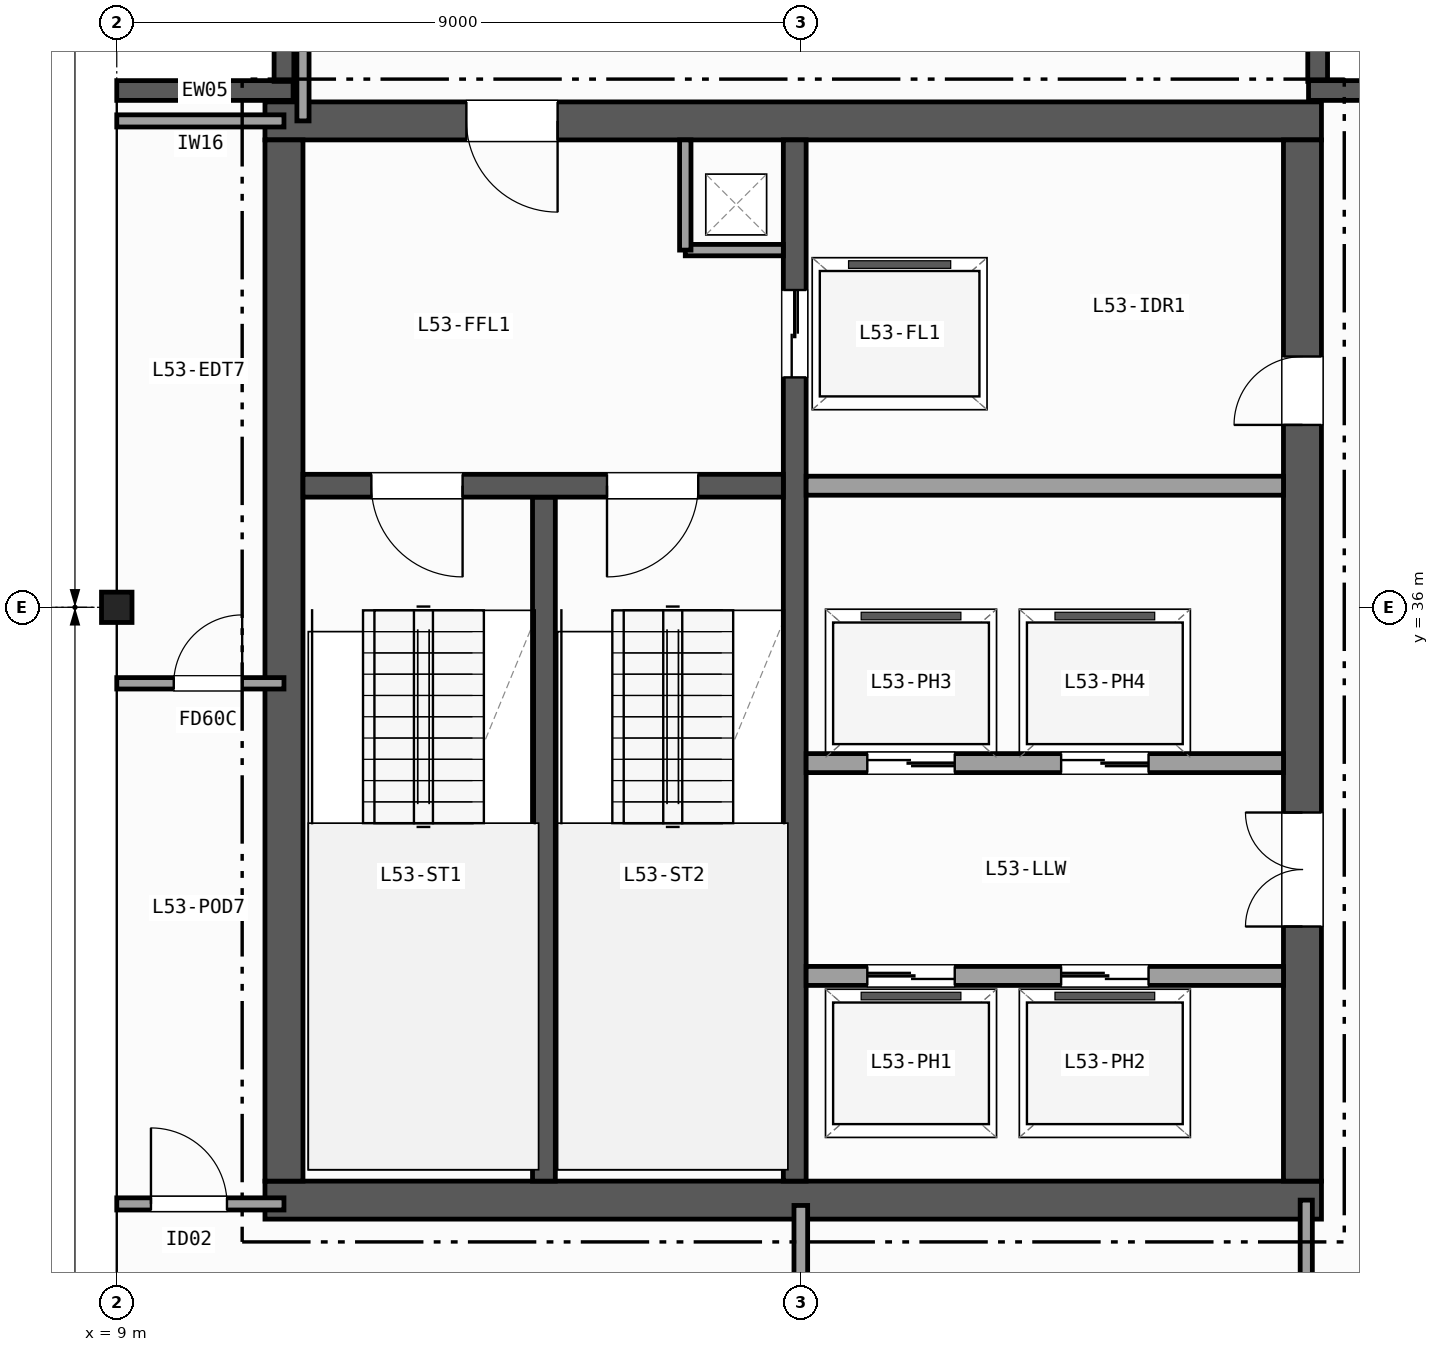
"""IFC4 building model, lengths in metres.
Left out: names, types, materials, properties, quantities, classifications, styles, units other than length and angle.
Written with IfcOpenShell. Run it as: python <this file> out.ifc"""

import sys

from ifc_helpers import new_model, si_unit, direction, frame, frame_2d, origin, origin_2d, place, context, subcontext, project, spatial, rectangle, i_section, extrude, element, fill, save


model = new_model("IFC4")
c1 = context("Model", 3, precision=1e-05, world=origin(), true_north=direction((0.0, 1.0)))
c2 = subcontext(c1, "Body", "Model", "MODEL_VIEW")
j1 = project(units=[si_unit("LENGTHUNIT", "METRE"), si_unit("PLANEANGLEUNIT", "RADIAN")], contexts=[c1])
p1 = place(None, origin())
s1 = spatial("IfcSite", under=j1, at=p1, CompositionType="ELEMENT")
p2 = place(p1, origin())
s2 = spatial("IfcBuilding", under=s1, at=p2, CompositionType="ELEMENT")
p3 = place(p2, frame((0.0, 0.0, 213.6)))
s3 = spatial("IfcBuildingStorey", under=s2, at=p3, CompositionType="ELEMENT", Elevation=213.6)
p4 = place(p3, frame((9.0, 36.0, 0.0), z_axis=(0.0, 0.0, 1.0), x_axis=(1.0, 0.0, 0.0)))
e1 = element("IfcColumn", 1, at=p4, inside=s3, PredefinedType="COLUMN", context=c2, shape_type="SweptSolid", body=[
    extrude(i_section(OverallWidth=0.401, OverallDepth=0.399, WebThickness=0.025, FlangeThickness=0.04, FilletRadius=0.015, at=origin_2d()), origin(), (0.0, 0.0, 1.0), 3.7),
])
p5 = place(p3, frame((9.0, 42.8, 0.0), z_axis=(0.0, 0.0, 1.0), x_axis=(1.0, 0.0, 0.0)))
e2 = element("IfcWall", 2, at=p5, inside=s3, PredefinedType="SOLIDWALL", context=c2, shape_type="SweptSolid", body=[
    extrude(rectangle(XDim=2.32, YDim=0.26, at=frame_2d((1.16, 0.0))), origin(), (0.0, 0.0, 1.0), 3.42),
])
for number, where, z_axis, x_axis in (
    (3, (11.2, 42.92, 0.0), (0.0, 0.0, 1.0), (0.0, 1.0, 0.0)),
    (4, (24.8, 45.0, 0.0), (0.0, 0.0, 1.0), (0.0, -1.0, 0.0)),
):
    element("IfcWall", number, at=place(p3, frame(where, z_axis=z_axis, x_axis=x_axis)), inside=s3, PredefinedType="SOLIDWALL", context=c2, shape_type="SweptSolid", body=[
        extrude(rectangle(XDim=2.08, YDim=0.26, at=frame_2d((1.04, 0.0))), origin(), (0.0, 0.0, 1.0), 3.42),
    ])
p6 = place(p3, frame((24.68, 42.8, 0.0), z_axis=(0.0, 0.0, 1.0), x_axis=(1.0, 0.0, 0.0)))
e5 = element("IfcWall", 5, at=p6, inside=s3, PredefinedType="SOLIDWALL", context=c2, shape_type="SweptSolid", body=[
    extrude(rectangle(XDim=2.32, YDim=0.26, at=frame_2d((1.16, 0.0))), origin(), (0.0, 0.0, 1.0), 3.42),
])
p7 = place(p3, frame((10.95, 28.2, 0.0), z_axis=(0.0, 0.0, 1.0), x_axis=(1.0, 0.0, 0.0)))
e6 = element("IfcWall", 6, at=p7, inside=s3, PredefinedType="SHEAR", context=c2, shape_type="SweptSolid", body=[
    extrude(rectangle(XDim=13.9, YDim=0.5, at=frame_2d((6.95, 0.0))), origin(), (0.0, 0.0, 1.0), 3.42),
])
p8 = place(p3, frame((24.85, 42.4, 0.0), z_axis=(0.0, 0.0, 1.0), x_axis=(-1.0, 0.0, 0.0)))
e7 = element("IfcWall", 7, at=p8, inside=s3, PredefinedType="SHEAR", context=c2, shape_type="SweptSolid", body=[
    extrude(rectangle(XDim=13.9, YDim=0.5, at=frame_2d((6.95, 0.0))), origin(), (0.0, 0.0, 1.0), 3.42),
])
p9 = place(p8, frame((10.05, 0.0, 0.0)))
e8 = element("IfcOpeningElement", 8, at=p9, cuts=e7, PredefinedType="OPENING", context=c2, shape_type="SweptSolid", body=[
    extrude(rectangle(XDim=1.2, YDim=2.15, at=frame_2d((0.6, 1.075))), frame((0.0, 0.26, 0.0), z_axis=(0.0, -1.0, 0.0), x_axis=(1.0, 0.0, 0.0)), (0.0, 0.0, 1.0), 0.52),
])
p10 = place(p3, frame((11.2, 42.15, 0.0), z_axis=(0.0, 0.0, 1.0), x_axis=(0.0, -1.0, 0.0)))
e9 = element("IfcWall", 9, at=p10, inside=s3, PredefinedType="SHEAR", context=c2, shape_type="SweptSolid", body=[
    extrude(rectangle(XDim=13.7, YDim=0.5, at=frame_2d((6.85, 0.0))), origin(), (0.0, 0.0, 1.0), 3.42),
])
p11 = place(p3, frame((24.6, 28.45, 0.0), z_axis=(0.0, 0.0, 1.0), x_axis=(0.0, 1.0, 0.0)))
e10 = element("IfcWall", 10, at=p11, inside=s3, PredefinedType="SHEAR", context=c2, shape_type="SweptSolid", body=[
    extrude(rectangle(XDim=13.7, YDim=0.5, at=frame_2d((6.85, 0.0))), origin(), (0.0, 0.0, 1.0), 3.42),
])
p12 = place(p11, frame((3.35, 0.0, 0.0)))
e11 = element("IfcOpeningElement", 11, at=p12, cuts=e10, PredefinedType="OPENING", context=c2, shape_type="SweptSolid", body=[
    extrude(rectangle(XDim=1.5, YDim=2.2, at=frame_2d((0.75, 1.1))), frame((0.0, 0.26, 0.0), z_axis=(0.0, -1.0, 0.0), x_axis=(1.0, 0.0, 0.0)), (0.0, 0.0, 1.0), 0.52),
])
p13 = place(p11, frame((9.95, 0.0, 0.0)))
e12 = element("IfcOpeningElement", 12, at=p13, cuts=e10, PredefinedType="OPENING", context=c2, shape_type="SweptSolid", body=[
    extrude(rectangle(XDim=0.9, YDim=2.1, at=frame_2d((0.45, 1.05))), frame((0.0, 0.26, 0.0), z_axis=(0.0, -1.0, 0.0), x_axis=(1.0, 0.0, 0.0)), (0.0, 0.0, 1.0), 0.52),
])
p14 = place(p3, frame((14.62, 28.45, 0.0), z_axis=(0.0, 0.0, 1.0), x_axis=(0.0, 1.0, 0.0)))
e13 = element("IfcWall", 13, at=p14, inside=s3, PredefinedType="SHEAR", context=c2, shape_type="SweptSolid", body=[
    extrude(rectangle(XDim=9.0, YDim=0.3, at=frame_2d((4.5, 0.0))), origin(), (0.0, 0.0, 1.0), 3.42),
])
p15 = place(p3, frame((17.92, 42.15, 0.0), z_axis=(0.0, 0.0, 1.0), x_axis=(0.0, -1.0, 0.0)))
e14 = element("IfcWall", 14, at=p15, inside=s3, PredefinedType="SHEAR", context=c2, shape_type="SweptSolid", body=[
    extrude(rectangle(XDim=13.7, YDim=0.3, at=frame_2d((6.85, 0.0))), origin(), (0.0, 0.0, 1.0), 3.42),
])
p16 = place(p15, frame((1.975, 0.0, 0.0)))
e15 = element("IfcOpeningElement", 15, at=p16, cuts=e14, PredefinedType="OPENING", context=c2, shape_type="SweptSolid", body=[
    extrude(rectangle(XDim=1.15, YDim=2.15, at=frame_2d((0.575, 1.075))), frame((0.0, 0.16, 0.0), z_axis=(0.0, -1.0, 0.0), x_axis=(1.0, 0.0, 0.0)), (0.0, 0.0, 1.0), 0.32),
])
p17 = place(p3, frame((17.77, 37.6, 0.0), z_axis=(0.0, 0.0, 1.0), x_axis=(-1.0, 0.0, 0.0)))
e16 = element("IfcWall", 16, at=p17, inside=s3, PredefinedType="SHEAR", context=c2, shape_type="SweptSolid", body=[
    extrude(rectangle(XDim=6.32, YDim=0.3, at=frame_2d((3.16, 0.0))), origin(), (0.0, 0.0, 1.0), 3.42),
])
p18 = place(p17, frame((4.22, 0.0, 0.0)))
e17 = element("IfcOpeningElement", 17, at=p18, cuts=e16, PredefinedType="OPENING", context=c2, shape_type="SweptSolid", body=[
    extrude(rectangle(XDim=1.2, YDim=2.15, at=frame_2d((0.6, 1.075))), frame((0.0, 0.16, 0.0), z_axis=(0.0, -1.0, 0.0), x_axis=(1.0, 0.0, 0.0)), (0.0, 0.0, 1.0), 0.32),
])
p19 = place(p17, frame((1.12, 0.0, 0.0)))
e18 = element("IfcOpeningElement", 18, at=p19, cuts=e16, PredefinedType="OPENING", context=c2, shape_type="SweptSolid", body=[
    extrude(rectangle(XDim=1.2, YDim=2.15, at=frame_2d((0.6, 1.075))), frame((0.0, 0.16, 0.0), z_axis=(0.0, -1.0, 0.0), x_axis=(1.0, 0.0, 0.0)), (0.0, 0.0, 1.0), 0.32),
])
p20 = place(p3, frame((16.48, 40.7, 0.0), z_axis=(0.0, 0.0, 1.0), x_axis=(1.0, 0.0, 0.0)))
e19 = element("IfcWall", 19, at=p20, inside=s3, PredefinedType="PARTITIONING", context=c2, shape_type="SweptSolid", body=[
    extrude(rectangle(XDim=1.29, YDim=0.15, at=frame_2d((0.645, 0.0))), origin(), (0.0, 0.0, 1.0), 3.42),
])
p21 = place(p3, frame((16.48, 40.7, 0.0), z_axis=(0.0, 0.0, 1.0), x_axis=(0.0, 1.0, 0.0)))
e20 = element("IfcWall", 20, at=p21, inside=s3, PredefinedType="PARTITIONING", context=c2, shape_type="SweptSolid", body=[
    extrude(rectangle(XDim=1.45, YDim=0.15, at=frame_2d((0.725, 0.0))), origin(), (0.0, 0.0, 1.0), 3.42),
])
p22 = place(p3, frame((18.07, 37.6, 0.0), z_axis=(0.0, 0.0, 1.0), x_axis=(1.0, 0.0, 0.0)))
e21 = element("IfcWall", 21, at=p22, inside=s3, PredefinedType="PARTITIONING", context=c2, shape_type="SweptSolid", body=[
    extrude(rectangle(XDim=6.28, YDim=0.25, at=frame_2d((3.14, 0.0))), origin(), (0.0, 0.0, 1.0), 3.42),
])
p23 = place(p3, frame((18.07, 31.15, 0.0), z_axis=(0.0, 0.0, 1.0), x_axis=(1.0, 0.0, 0.0)))
e22 = element("IfcWall", 22, at=p23, inside=s3, PredefinedType="PARTITIONING", context=c2, shape_type="SweptSolid", body=[
    extrude(rectangle(XDim=6.28, YDim=0.25, at=frame_2d((3.14, 0.0))), origin(), (0.0, 0.0, 1.0), 3.42),
])
p24 = place(p23, frame((0.805, 0.0, 0.0)))
e23 = element("IfcOpeningElement", 23, at=p24, cuts=e22, PredefinedType="OPENING", context=c2, shape_type="SweptSolid", body=[
    extrude(rectangle(XDim=1.15, YDim=2.15, at=frame_2d((0.575, 1.075))), frame((0.0, 0.135, 0.0), z_axis=(0.0, -1.0, 0.0), x_axis=(1.0, 0.0, 0.0)), (0.0, 0.0, 1.0), 0.27),
])
p25 = place(p23, frame((3.355, 0.0, 0.0)))
e24 = element("IfcOpeningElement", 24, at=p25, cuts=e22, PredefinedType="OPENING", context=c2, shape_type="SweptSolid", body=[
    extrude(rectangle(XDim=1.15, YDim=2.15, at=frame_2d((0.575, 1.075))), frame((0.0, 0.135, 0.0), z_axis=(0.0, -1.0, 0.0), x_axis=(1.0, 0.0, 0.0)), (0.0, 0.0, 1.0), 0.27),
])
p26 = place(p3, frame((24.35, 33.95, 0.0), z_axis=(0.0, 0.0, 1.0), x_axis=(-1.0, 0.0, 0.0)))
e25 = element("IfcWall", 25, at=p26, inside=s3, PredefinedType="PARTITIONING", context=c2, shape_type="SweptSolid", body=[
    extrude(rectangle(XDim=6.28, YDim=0.25, at=frame_2d((3.14, 0.0))), origin(), (0.0, 0.0, 1.0), 3.42),
])
p27 = place(p26, frame((4.325, 0.0, 0.0)))
e26 = element("IfcOpeningElement", 26, at=p27, cuts=e25, PredefinedType="OPENING", context=c2, shape_type="SweptSolid", body=[
    extrude(rectangle(XDim=1.15, YDim=2.15, at=frame_2d((0.575, 1.075))), frame((0.0, 0.135, 0.0), z_axis=(0.0, -1.0, 0.0), x_axis=(1.0, 0.0, 0.0)), (0.0, 0.0, 1.0), 0.27),
])
p28 = place(p26, frame((1.775, 0.0, 0.0)))
e27 = element("IfcOpeningElement", 27, at=p28, cuts=e25, PredefinedType="OPENING", context=c2, shape_type="SweptSolid", body=[
    extrude(rectangle(XDim=1.15, YDim=2.15, at=frame_2d((0.575, 1.075))), frame((0.0, 0.135, 0.0), z_axis=(0.0, -1.0, 0.0), x_axis=(1.0, 0.0, 0.0)), (0.0, 0.0, 1.0), 0.27),
])
p29 = place(p3, frame((9.0, 28.15, 0.0), z_axis=(0.0, 0.0, 1.0), x_axis=(1.0, 0.0, 0.0)))
e28 = element("IfcWall", 28, at=p29, inside=s3, PredefinedType="PARTITIONING", context=c2, shape_type="SweptSolid", body=[
    extrude(rectangle(XDim=2.2, YDim=0.16, at=frame_2d((1.1, 0.0))), origin(), (0.0, 0.0, 1.0), 2.707),
])
p30 = place(p29, frame((0.45, 0.0, 0.0)))
e29 = element("IfcOpeningElement", 29, at=p30, cuts=e28, PredefinedType="OPENING", context=c2, shape_type="SweptSolid", body=[
    extrude(rectangle(XDim=1.0, YDim=2.1, at=frame_2d((0.5, 1.05))), frame((0.0, 0.09, 0.0), z_axis=(0.0, -1.0, 0.0), x_axis=(1.0, 0.0, 0.0)), (0.0, 0.0, 1.0), 0.18),
])
p31 = place(p3, frame((9.0, 42.4, 0.0), z_axis=(0.0, 0.0, 1.0), x_axis=(1.0, 0.0, 0.0)))
e30 = element("IfcWall", 30, at=p31, inside=s3, PredefinedType="PARTITIONING", context=c2, shape_type="SweptSolid", body=[
    extrude(rectangle(XDim=2.2, YDim=0.16, at=frame_2d((1.1, 0.0))), origin(), (0.0, 0.0, 1.0), 3.42),
])
p32 = place(p3, frame((11.45, 42.4, 0.0), z_axis=(0.0, 0.0, 1.0), x_axis=(0.0, 1.0, 0.0)))
e31 = element("IfcWall", 31, at=p32, inside=s3, PredefinedType="PARTITIONING", context=c2, shape_type="SweptSolid", body=[
    extrude(rectangle(XDim=2.666, YDim=0.16, at=frame_2d((1.333, 0.0))), origin(), (0.0, 0.0, 1.0), 3.42),
])
p33 = place(p3, frame((9.0, 35.0, 0.0), z_axis=(0.0, 0.0, 1.0), x_axis=(1.0, 0.0, 0.0)))
e32 = element("IfcWall", 32, at=p33, inside=s3, PredefinedType="PARTITIONING", context=c2, shape_type="SweptSolid", body=[
    extrude(rectangle(XDim=2.2, YDim=0.15, at=frame_2d((1.1, 0.0))), origin(), (0.0, 0.0, 1.0), 2.707),
])
p34 = place(p33, frame((0.75, 0.0, 0.0)))
e33 = element("IfcOpeningElement", 33, at=p34, cuts=e32, PredefinedType="OPENING", context=c2, shape_type="SweptSolid", body=[
    extrude(rectangle(XDim=0.9, YDim=2.1, at=frame_2d((0.45, 1.05))), frame((0.0, 0.085, 0.0), z_axis=(0.0, -1.0, 0.0), x_axis=(1.0, 0.0, 0.0)), (0.0, 0.0, 1.0), 0.17),
])
p35 = place(p3, frame((24.65, 9.0, 0.0), z_axis=(0.0, 0.0, 1.0), x_axis=(0.0, 1.0, 0.0)))
e34 = element("IfcWall", 34, at=p35, inside=s3, PredefinedType="PARTITIONING", context=c2, shape_type="SweptSolid", body=[
    extrude(rectangle(XDim=19.2, YDim=0.16, at=frame_2d((9.6, 0.0))), origin(), (0.0, 0.0, 1.0), 2.707),
])
p36 = place(p35, frame((2.8, 0.0, 0.0)))
e35 = element("IfcOpeningElement", 35, at=p36, cuts=e34, PredefinedType="OPENING", context=c2, shape_type="SweptSolid", body=[
    extrude(rectangle(XDim=1.2, YDim=2.15, at=frame_2d((0.6, 1.075))), frame((0.0, 0.09, 0.0), z_axis=(0.0, -1.0, 0.0), x_axis=(1.0, 0.0, 0.0)), (0.0, 0.0, 1.0), 0.18),
])
p37 = place(p35, frame((8.95, 0.0, 0.0)))
e36 = element("IfcOpeningElement", 36, at=p37, cuts=e34, PredefinedType="OPENING", context=c2, shape_type="SweptSolid", body=[
    extrude(rectangle(XDim=0.86, YDim=2.05, at=frame_2d((0.43, 1.025))), frame((0.0, 0.09, 0.0), z_axis=(0.0, -1.0, 0.0), x_axis=(1.0, 0.0, 0.0)), (0.0, 0.0, 1.0), 0.18),
])
p38 = place(p35, frame((15.215, 0.0, 0.0)))
e37 = element("IfcOpeningElement", 37, at=p38, cuts=e34, PredefinedType="OPENING", context=c2, shape_type="SweptSolid", body=[
    extrude(rectangle(XDim=0.95, YDim=2.1, at=frame_2d((0.475, 1.05))), frame((0.0, 0.09, 0.0), z_axis=(0.0, -1.0, 0.0), x_axis=(1.0, 0.0, 0.0)), (0.0, 0.0, 1.0), 0.18),
])
p39 = place(p3, frame((18.0, 9.0, 0.0), z_axis=(0.0, 0.0, 1.0), x_axis=(0.0, 1.0, 0.0)))
e38 = element("IfcWall", 38, at=p39, inside=s3, PredefinedType="PARTITIONING", context=c2, shape_type="SweptSolid", body=[
    extrude(rectangle(XDim=19.13, YDim=0.18, at=frame_2d((9.565, 0.0))), origin(), (0.0, 0.0, 1.0), 2.707),
])
p40 = place(p39, frame((2.2, 0.0, 0.0)))
e39 = element("IfcOpeningElement", 39, at=p40, cuts=e38, PredefinedType="OPENING", context=c2, shape_type="SweptSolid", body=[
    extrude(rectangle(XDim=1.0, YDim=2.1, at=frame_2d((0.5, 1.05))), frame((0.0, 0.1, 0.0), z_axis=(0.0, -1.0, 0.0), x_axis=(1.0, 0.0, 0.0)), (0.0, 0.0, 1.0), 0.2),
])
p41 = place(p39, frame((13.5, 0.0, 0.0)))
e40 = element("IfcOpeningElement", 40, at=p41, cuts=e38, PredefinedType="OPENING", context=c2, shape_type="SweptSolid", body=[
    extrude(rectangle(XDim=1.05, YDim=2.15, at=frame_2d((0.525, 1.075))), frame((0.0, 0.1, 0.0), z_axis=(0.0, -1.0, 0.0), x_axis=(1.0, 0.0, 0.0)), (0.0, 0.0, 1.0), 0.2),
])
p42 = place(p18, origin())
e41 = element("IfcDoor", 41, at=p42, inside=s3, OperationType="SINGLE_SWING_LEFT", PredefinedType="DOOR", context=c2, shape_type="SweptSolid", body=[
    extrude(rectangle(XDim=1.2, YDim=2.15, at=frame_2d((0.6, 1.075))), frame((0.0, 0.025, 0.0), z_axis=(0.0, -1.0, 0.0), x_axis=(1.0, 0.0, 0.0)), (0.0, 0.0, 1.0), 0.05),
])
fill(e17, e41)
p43 = place(p19, origin())
e42 = element("IfcDoor", 42, at=p43, inside=s3, OperationType="SINGLE_SWING_RIGHT", PredefinedType="DOOR", context=c2, shape_type="SweptSolid", body=[
    extrude(rectangle(XDim=1.2, YDim=2.15, at=frame_2d((0.6, 1.075))), frame((0.0, 0.025, 0.0), z_axis=(0.0, -1.0, 0.0), x_axis=(1.0, 0.0, 0.0)), (0.0, 0.0, 1.0), 0.05),
])
fill(e18, e42)
p44 = place(p12, origin())
e43 = element("IfcDoor", 43, at=p44, inside=s3, OperationType="DOUBLE_DOOR_SINGLE_SWING", PredefinedType="DOOR", context=c2, shape_type="SweptSolid", body=[
    extrude(rectangle(XDim=1.5, YDim=2.2, at=frame_2d((0.75, 1.1))), frame((0.0, 0.025, 0.0), z_axis=(0.0, -1.0, 0.0), x_axis=(1.0, 0.0, 0.0)), (0.0, 0.0, 1.0), 0.05),
])
fill(e11, e43)
p45 = place(p9, origin())
e44 = element("IfcDoor", 44, at=p45, inside=s3, OperationType="SINGLE_SWING_LEFT", PredefinedType="DOOR", context=c2, shape_type="SweptSolid", body=[
    extrude(rectangle(XDim=1.2, YDim=2.15, at=frame_2d((0.6, 1.075))), frame((0.0, 0.025, 0.0), z_axis=(0.0, -1.0, 0.0), x_axis=(1.0, 0.0, 0.0)), (0.0, 0.0, 1.0), 0.05),
])
fill(e8, e44)
p46 = place(p13, origin())
e45 = element("IfcDoor", 45, at=p46, inside=s3, OperationType="SINGLE_SWING_LEFT", PredefinedType="DOOR", context=c2, shape_type="SweptSolid", body=[
    extrude(rectangle(XDim=0.9, YDim=2.1, at=frame_2d((0.45, 1.05))), frame((0.0, 0.025, 0.0), z_axis=(0.0, -1.0, 0.0), x_axis=(1.0, 0.0, 0.0)), (0.0, 0.0, 1.0), 0.05),
])
fill(e12, e45)
p47 = place(p16, origin())
e46 = element("IfcDoor", 46, at=p47, inside=s3, OperationType="DOUBLE_DOOR_SLIDING", PredefinedType="DOOR", context=c2, shape_type="SweptSolid", body=[
    extrude(rectangle(XDim=1.15, YDim=2.15, at=frame_2d((0.575, 1.075))), frame((0.0, 0.025, 0.0), z_axis=(0.0, -1.0, 0.0), x_axis=(1.0, 0.0, 0.0)), (0.0, 0.0, 1.0), 0.05),
])
fill(e15, e46)
p48 = place(p24, origin())
e47 = element("IfcDoor", 47, at=p48, inside=s3, OperationType="DOUBLE_DOOR_SLIDING", PredefinedType="DOOR", context=c2, shape_type="SweptSolid", body=[
    extrude(rectangle(XDim=1.15, YDim=2.15, at=frame_2d((0.575, 1.075))), frame((0.0, 0.025, 0.0), z_axis=(0.0, -1.0, 0.0), x_axis=(1.0, 0.0, 0.0)), (0.0, 0.0, 1.0), 0.05),
])
fill(e23, e47)
p49 = place(p25, origin())
e48 = element("IfcDoor", 48, at=p49, inside=s3, OperationType="DOUBLE_DOOR_SLIDING", PredefinedType="DOOR", context=c2, shape_type="SweptSolid", body=[
    extrude(rectangle(XDim=1.15, YDim=2.15, at=frame_2d((0.575, 1.075))), frame((0.0, 0.025, 0.0), z_axis=(0.0, -1.0, 0.0), x_axis=(1.0, 0.0, 0.0)), (0.0, 0.0, 1.0), 0.05),
])
fill(e24, e48)
p50 = place(p27, origin())
e49 = element("IfcDoor", 49, at=p50, inside=s3, OperationType="DOUBLE_DOOR_SLIDING", PredefinedType="DOOR", context=c2, shape_type="SweptSolid", body=[
    extrude(rectangle(XDim=1.15, YDim=2.15, at=frame_2d((0.575, 1.075))), frame((0.0, 0.025, 0.0), z_axis=(0.0, -1.0, 0.0), x_axis=(1.0, 0.0, 0.0)), (0.0, 0.0, 1.0), 0.05),
])
fill(e26, e49)
p51 = place(p28, origin())
e50 = element("IfcDoor", 50, at=p51, inside=s3, OperationType="DOUBLE_DOOR_SLIDING", PredefinedType="DOOR", context=c2, shape_type="SweptSolid", body=[
    extrude(rectangle(XDim=1.15, YDim=2.15, at=frame_2d((0.575, 1.075))), frame((0.0, 0.025, 0.0), z_axis=(0.0, -1.0, 0.0), x_axis=(1.0, 0.0, 0.0)), (0.0, 0.0, 1.0), 0.05),
])
fill(e27, e50)
p52 = place(p30, origin())
e51 = element("IfcDoor", 51, at=p52, inside=s3, OperationType="SINGLE_SWING_LEFT", PredefinedType="DOOR", context=c2, shape_type="SweptSolid", body=[
    extrude(rectangle(XDim=1.0, YDim=2.1, at=frame_2d((0.5, 1.05))), frame((0.0, 0.025, 0.0), z_axis=(0.0, -1.0, 0.0), x_axis=(1.0, 0.0, 0.0)), (0.0, 0.0, 1.0), 0.05),
])
fill(e29, e51)
p53 = place(p34, origin())
e52 = element("IfcDoor", 52, at=p53, inside=s3, OperationType="SINGLE_SWING_RIGHT", PredefinedType="DOOR", context=c2, shape_type="SweptSolid", body=[
    extrude(rectangle(XDim=0.9, YDim=2.1, at=frame_2d((0.45, 1.05))), frame((0.0, 0.025, 0.0), z_axis=(0.0, -1.0, 0.0), x_axis=(1.0, 0.0, 0.0)), (0.0, 0.0, 1.0), 0.05),
])
fill(e33, e52)
save(model, sys.argv[1])
